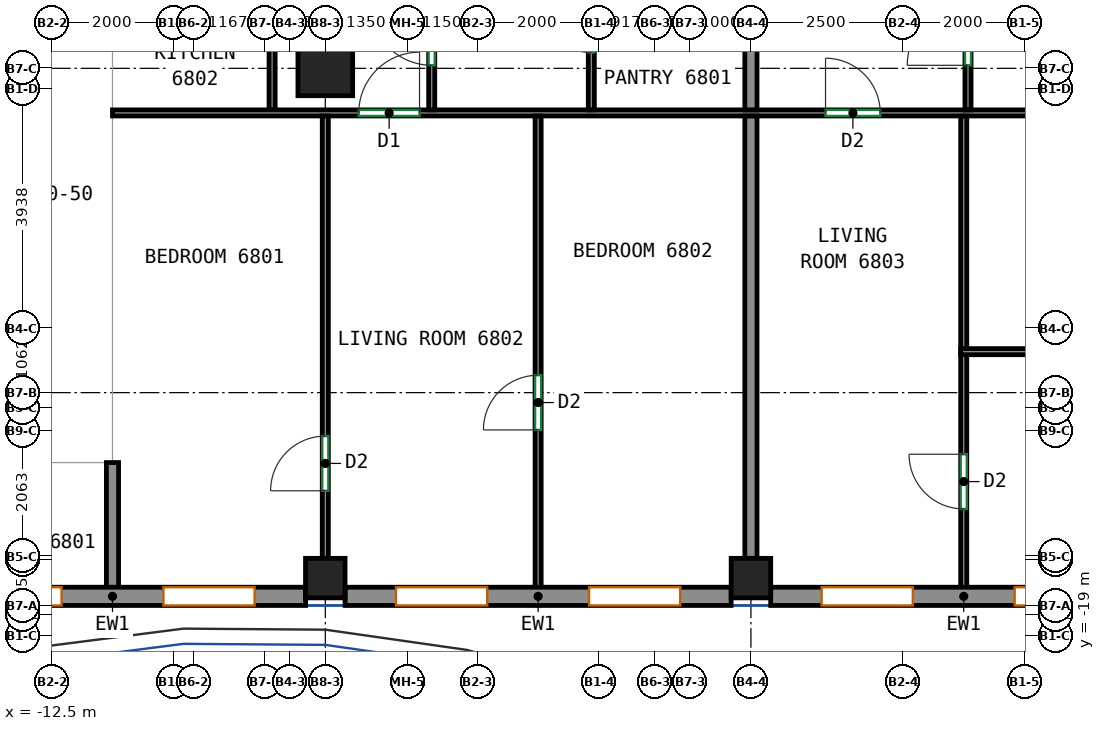
"""IFC4 building model, lengths in metres.
Left out: names, types, materials, properties, quantities, classifications, styles, units other than length and angle.
Written with IfcOpenShell. Run it as: python <this file> out.ifc"""

import sys

from ifc_helpers import new_model, si_unit, direction, frame, frame_2d, origin, origin_2d, place, context, subcontext, project, spatial, rectangle, extrude, source, transform, mapped, element, fill, save


model = new_model("IFC4")
c1 = context("Model", 3, precision=1e-05, world=origin(), true_north=direction((0.0, 1.0)))
c2 = subcontext(c1, "Body", "Model", "MODEL_VIEW")
j1 = project(units=[si_unit("LENGTHUNIT", "METRE"), si_unit("PLANEANGLEUNIT", "RADIAN")], contexts=[c1])
p1 = place(None, origin())
s1 = spatial("IfcSite", under=j1, at=p1, CompositionType="ELEMENT")
p2 = place(p1, origin())
s2 = spatial("IfcBuilding", under=s1, at=p2, CompositionType="ELEMENT")
p3 = place(p2, frame((0.0, 0.0, 277.2)))
s3 = spatial("IfcBuildingStorey", under=s2, at=p3, CompositionType="ELEMENT", Elevation=277.2)
m1 = source(origin(), c2, "Body", "SweptSolid", [
    extrude(rectangle(XDim=0.65, YDim=0.65, at=origin_2d()), origin(), (0.0, 0.0, 1.0), 3.12),
])
p4 = place(p3, frame((-8.0, -18.05, 0.0), z_axis=(0.0, 0.0, 1.0), x_axis=(1.0, 0.0, 0.0)))
e1 = element("IfcColumn", 1, at=p4, inside=s3, PredefinedType="COLUMN", context=c2, shape_type="MappedRepresentation", body=[
    mapped(m1, transform((0.0, 0.0, 0.0))),
])
m2 = source(origin(), c2, "Body", "SweptSolid", [
    extrude(rectangle(XDim=0.9, YDim=0.9, at=origin_2d()), origin(), (0.0, 0.0, 1.0), 3.12),
])
p5 = place(p3, frame((-8.0, -9.667, 0.0), z_axis=(0.0, 0.0, 1.0), x_axis=(1.0, 0.0, 0.0)))
e2 = element("IfcColumn", 2, at=p5, inside=s3, PredefinedType="COLUMN", context=c2, shape_type="MappedRepresentation", body=[
    mapped(m2, transform((0.0, 0.0, 0.0))),
])
p6 = place(p3, frame((-1.0, -18.05, 0.0), z_axis=(0.0, 0.0, 1.0), x_axis=(1.0, 0.0, 0.0)))
e3 = element("IfcColumn", 3, at=p6, inside=s3, PredefinedType="COLUMN", context=c2, shape_type="MappedRepresentation", body=[
    mapped(m1, transform((0.0, 0.0, 0.0))),
])
m3 = source(origin(), c2, "Body", "SweptSolid", [
    extrude(rectangle(XDim=6.35, YDim=0.3, at=frame_2d((3.175, 0.0))), origin(), (0.0, 0.0, 1.0), 3.12),
])
p7 = place(p3, frame((-14.675, -18.35, 0.0), z_axis=(0.0, 0.0, 1.0), x_axis=(1.0, 0.0, 0.0)))
e4 = element("IfcWall", 4, at=p7, inside=s3, PredefinedType="SOLIDWALL", context=c2, shape_type="MappedRepresentation", body=[
    mapped(m3, transform((0.0, 0.0, 0.0))),
])
p8 = place(p7, frame((0.837, 0.0, 0.8)))
e5 = element("IfcOpeningElement", 5, at=p8, cuts=e4, PredefinedType="OPENING", context=c2, shape_type="SweptSolid", body=[
    extrude(rectangle(XDim=1.5, YDim=2.05, at=frame_2d((0.75, 1.025))), frame((0.0, 0.16, 0.0), z_axis=(0.0, -1.0, 0.0), x_axis=(1.0, 0.0, 0.0)), (0.0, 0.0, 1.0), 0.32),
])
p9 = place(p7, frame((4.012, 0.0, 0.8)))
e6 = element("IfcOpeningElement", 6, at=p9, cuts=e4, PredefinedType="OPENING", context=c2, shape_type="SweptSolid", body=[
    extrude(rectangle(XDim=1.5, YDim=2.05, at=frame_2d((0.75, 1.025))), frame((0.0, 0.16, 0.0), z_axis=(0.0, -1.0, 0.0), x_axis=(1.0, 0.0, 0.0)), (0.0, 0.0, 1.0), 0.32),
])
p10 = place(p3, frame((-7.675, -18.35, 0.0), z_axis=(0.0, 0.0, 1.0), x_axis=(1.0, 0.0, 0.0)))
e7 = element("IfcWall", 7, at=p10, inside=s3, PredefinedType="SOLIDWALL", context=c2, shape_type="MappedRepresentation", body=[
    mapped(m3, transform((0.0, 0.0, 0.0))),
])
p11 = place(p10, frame((0.837, 0.0, 0.8)))
e8 = element("IfcOpeningElement", 8, at=p11, cuts=e7, PredefinedType="OPENING", context=c2, shape_type="SweptSolid", body=[
    extrude(rectangle(XDim=1.5, YDim=2.05, at=frame_2d((0.75, 1.025))), frame((0.0, 0.16, 0.0), z_axis=(0.0, -1.0, 0.0), x_axis=(1.0, 0.0, 0.0)), (0.0, 0.0, 1.0), 0.32),
])
p12 = place(p10, frame((4.012, 0.0, 0.8)))
e9 = element("IfcOpeningElement", 9, at=p12, cuts=e7, PredefinedType="OPENING", context=c2, shape_type="SweptSolid", body=[
    extrude(rectangle(XDim=1.5, YDim=2.05, at=frame_2d((0.75, 1.025))), frame((0.0, 0.16, 0.0), z_axis=(0.0, -1.0, 0.0), x_axis=(1.0, 0.0, 0.0)), (0.0, 0.0, 1.0), 0.32),
])
p13 = place(p3, frame((-0.675, -18.35, 0.0), z_axis=(0.0, 0.0, 1.0), x_axis=(1.0, 0.0, 0.0)))
e10 = element("IfcWall", 10, at=p13, inside=s3, PredefinedType="SOLIDWALL", context=c2, shape_type="MappedRepresentation", body=[
    mapped(m3, transform((0.0, 0.0, 0.0))),
])
p14 = place(p13, frame((0.837, 0.0, 0.8)))
e11 = element("IfcOpeningElement", 11, at=p14, cuts=e10, PredefinedType="OPENING", context=c2, shape_type="SweptSolid", body=[
    extrude(rectangle(XDim=1.5, YDim=2.05, at=frame_2d((0.75, 1.025))), frame((0.0, 0.16, 0.0), z_axis=(0.0, -1.0, 0.0), x_axis=(1.0, 0.0, 0.0)), (0.0, 0.0, 1.0), 0.32),
])
p15 = place(p13, frame((4.012, 0.0, 0.8)))
e12 = element("IfcOpeningElement", 12, at=p15, cuts=e10, PredefinedType="OPENING", context=c2, shape_type="SweptSolid", body=[
    extrude(rectangle(XDim=1.5, YDim=2.05, at=frame_2d((0.75, 1.025))), frame((0.0, 0.16, 0.0), z_axis=(0.0, -1.0, 0.0), x_axis=(1.0, 0.0, 0.0)), (0.0, 0.0, 1.0), 0.32),
])
p16 = place(p3, frame((-11.5, -18.25, 0.0), z_axis=(0.0, 0.0, 1.0), x_axis=(0.0, 1.0, 0.0)))
e13 = element("IfcWall", 13, at=p16, inside=s3, PredefinedType="PARTITIONING", context=c2, shape_type="SweptSolid", body=[
    extrude(rectangle(XDim=2.1, YDim=0.2, at=frame_2d((1.05, 0.0))), origin(), (0.0, 0.0, 1.0), 3.12),
])
p17 = place(p3, frame((-8.875, -10.35, 0.0), z_axis=(0.0, 0.0, 1.0), x_axis=(0.0, 1.0, 0.0)))
e14 = element("IfcWall", 14, at=p17, inside=s3, PredefinedType="PARTITIONING", context=c2, shape_type="SweptSolid", body=[
    extrude(rectangle(XDim=2.573, YDim=0.1, at=frame_2d((1.287, 0.0))), origin(), (0.0, 0.0, 1.0), 3.12),
])
p18 = place(p17, frame((1.266, 0.0, 0.0)))
e15 = element("IfcOpeningElement", 15, at=p18, cuts=e14, PredefinedType="OPENING", context=c2, shape_type="SweptSolid", body=[
    extrude(rectangle(XDim=1.0, YDim=2.1, at=frame_2d((0.5, 1.05))), frame((0.0, 0.06, 0.0), z_axis=(0.0, -1.0, 0.0), x_axis=(1.0, 0.0, 0.0)), (0.0, 0.0, 1.0), 0.12),
])
p19 = place(p3, frame((-11.5, -10.4, 0.0), z_axis=(0.0, 0.0, 1.0), x_axis=(1.0, 0.0, 0.0)))
e16 = element("IfcWall", 16, at=p19, inside=s3, PredefinedType="PARTITIONING", context=c2, shape_type="SweptSolid", body=[
    extrude(rectangle(XDim=21.1, YDim=0.1, at=frame_2d((10.55, 0.0))), origin(), (0.0, 0.0, 1.0), 3.12),
])
p20 = place(p19, frame((4.05, 0.0, 0.0)))
e17 = element("IfcOpeningElement", 17, at=p20, cuts=e16, PredefinedType="OPENING", context=c2, shape_type="SweptSolid", body=[
    extrude(rectangle(XDim=1.0, YDim=2.1, at=frame_2d((0.5, 1.05))), frame((0.0, 0.06, 0.0), z_axis=(0.0, -1.0, 0.0), x_axis=(1.0, 0.0, 0.0)), (0.0, 0.0, 1.0), 0.12),
])
p21 = place(p19, frame((11.727, 0.0, 0.0)))
e18 = element("IfcOpeningElement", 18, at=p21, cuts=e16, PredefinedType="OPENING", context=c2, shape_type="SweptSolid", body=[
    extrude(rectangle(XDim=0.9, YDim=2.1, at=frame_2d((0.45, 1.05))), frame((0.0, 0.06, 0.0), z_axis=(0.0, -1.0, 0.0), x_axis=(1.0, 0.0, 0.0)), (0.0, 0.0, 1.0), 0.12),
])
p22 = place(p19, frame((15.225, 0.0, 0.0)))
e19 = element("IfcOpeningElement", 19, at=p22, cuts=e16, PredefinedType="OPENING", context=c2, shape_type="SweptSolid", body=[
    extrude(rectangle(XDim=1.0, YDim=2.1, at=frame_2d((0.5, 1.05))), frame((0.0, 0.06, 0.0), z_axis=(0.0, -1.0, 0.0), x_axis=(1.0, 0.0, 0.0)), (0.0, 0.0, 1.0), 0.12),
])
p23 = place(p3, frame((-6.25, -10.35, 0.0), z_axis=(0.0, 0.0, 1.0), x_axis=(0.0, 1.0, 0.0)))
e20 = element("IfcWall", 20, at=p23, inside=s3, PredefinedType="PARTITIONING", context=c2, shape_type="SweptSolid", body=[
    extrude(rectangle(XDim=2.573, YDim=0.1, at=frame_2d((1.287, 0.0))), origin(), (0.0, 0.0, 1.0), 3.12),
])
p24 = place(p23, frame((0.733, 0.0, 0.0)))
e21 = element("IfcOpeningElement", 21, at=p24, cuts=e20, PredefinedType="OPENING", context=c2, shape_type="SweptSolid", body=[
    extrude(rectangle(XDim=1.0, YDim=2.1, at=frame_2d((0.5, 1.05))), frame((0.0, 0.06, 0.0), z_axis=(0.0, -1.0, 0.0), x_axis=(1.0, 0.0, 0.0)), (0.0, 0.0, 1.0), 0.12),
])
p25 = place(p3, frame((-3.625, -10.35, 0.0), z_axis=(0.0, 0.0, 1.0), x_axis=(0.0, 1.0, 0.0)))
e22 = element("IfcWall", 22, at=p25, inside=s3, PredefinedType="PARTITIONING", context=c2, shape_type="SweptSolid", body=[
    extrude(rectangle(XDim=2.573, YDim=0.1, at=frame_2d((1.287, 0.0))), origin(), (0.0, 0.0, 1.0), 3.12),
])
p26 = place(p25, frame((0.943, 0.0, 0.0)))
e23 = element("IfcOpeningElement", 23, at=p26, cuts=e22, PredefinedType="OPENING", context=c2, shape_type="SweptSolid", body=[
    extrude(rectangle(XDim=0.9, YDim=2.1, at=frame_2d((0.45, 1.05))), frame((0.0, 0.06, 0.0), z_axis=(0.0, -1.0, 0.0), x_axis=(1.0, 0.0, 0.0)), (0.0, 0.0, 1.0), 0.12),
])
p27 = place(p3, frame((-1.0, -10.35, 0.0), z_axis=(0.0, 0.0, 1.0), x_axis=(0.0, 1.0, 0.0)))
e24 = element("IfcWall", 24, at=p27, inside=s3, PredefinedType="PARTITIONING", context=c2, shape_type="SweptSolid", body=[
    extrude(rectangle(XDim=2.573, YDim=0.2, at=frame_2d((1.287, 0.0))), origin(), (0.0, 0.0, 1.0), 3.12),
])
p28 = place(p3, frame((-8.0, -17.725, 0.0), z_axis=(0.0, 0.0, 1.0), x_axis=(0.0, 1.0, 0.0)))
e25 = element("IfcWall", 25, at=p28, inside=s3, PredefinedType="PARTITIONING", context=c2, shape_type="SweptSolid", body=[
    extrude(rectangle(XDim=7.273, YDim=0.1, at=frame_2d((3.637, 0.0))), origin(), (0.0, 0.0, 1.0), 3.12),
])
p29 = place(p28, frame((1.111, 0.0, 0.0)))
e26 = element("IfcOpeningElement", 26, at=p29, cuts=e25, PredefinedType="OPENING", context=c2, shape_type="SweptSolid", body=[
    extrude(rectangle(XDim=0.9, YDim=2.1, at=frame_2d((0.45, 1.05))), frame((0.0, 0.06, 0.0), z_axis=(0.0, -1.0, 0.0), x_axis=(1.0, 0.0, 0.0)), (0.0, 0.0, 1.0), 0.12),
])
p30 = place(p3, frame((-4.5, -18.25, 0.0), z_axis=(0.0, 0.0, 1.0), x_axis=(0.0, 1.0, 0.0)))
e27 = element("IfcWall", 27, at=p30, inside=s3, PredefinedType="PARTITIONING", context=c2, shape_type="SweptSolid", body=[
    extrude(rectangle(XDim=7.798, YDim=0.1, at=frame_2d((3.899, 0.0))), origin(), (0.0, 0.0, 1.0), 3.12),
])
p31 = place(p30, frame((2.637, 0.0, 0.0)))
e28 = element("IfcOpeningElement", 28, at=p31, cuts=e27, PredefinedType="OPENING", context=c2, shape_type="SweptSolid", body=[
    extrude(rectangle(XDim=0.9, YDim=2.1, at=frame_2d((0.45, 1.05))), frame((0.0, 0.06, 0.0), z_axis=(0.0, -1.0, 0.0), x_axis=(1.0, 0.0, 0.0)), (0.0, 0.0, 1.0), 0.12),
])
p32 = place(p3, frame((-1.0, -17.725, 0.0), z_axis=(0.0, 0.0, 1.0), x_axis=(0.0, 1.0, 0.0)))
e29 = element("IfcWall", 29, at=p32, inside=s3, PredefinedType="PARTITIONING", context=c2, shape_type="SweptSolid", body=[
    extrude(rectangle(XDim=7.273, YDim=0.2, at=frame_2d((3.637, 0.0))), origin(), (0.0, 0.0, 1.0), 3.12),
])
p33 = place(p3, frame((2.57, -10.35, 0.0), z_axis=(0.0, 0.0, 1.0), x_axis=(0.0, 1.0, 0.0)))
e30 = element("IfcWall", 30, at=p33, inside=s3, PredefinedType="PARTITIONING", context=c2, shape_type="SweptSolid", body=[
    extrude(rectangle(XDim=2.573, YDim=0.1, at=frame_2d((1.287, 0.0))), origin(), (0.0, 0.0, 1.0), 3.12),
])
p34 = place(p33, frame((0.733, 0.0, 0.0)))
e31 = element("IfcOpeningElement", 31, at=p34, cuts=e30, PredefinedType="OPENING", context=c2, shape_type="SweptSolid", body=[
    extrude(rectangle(XDim=1.0, YDim=2.1, at=frame_2d((0.5, 1.05))), frame((0.0, 0.06, 0.0), z_axis=(0.0, -1.0, 0.0), x_axis=(1.0, 0.0, 0.0)), (0.0, 0.0, 1.0), 0.12),
])
p35 = place(p3, frame((2.5, -18.25, 0.0), z_axis=(0.0, 0.0, 1.0), x_axis=(0.0, 1.0, 0.0)))
e32 = element("IfcWall", 32, at=p35, inside=s3, PredefinedType="PARTITIONING", context=c2, shape_type="SweptSolid", body=[
    extrude(rectangle(XDim=3.884, YDim=0.1, at=frame_2d((1.942, 0.0))), origin(), (0.0, 0.0, 1.0), 3.12),
])
p36 = place(p35, frame((1.337, 0.0, 0.0)))
e33 = element("IfcOpeningElement", 33, at=p36, cuts=e32, PredefinedType="OPENING", context=c2, shape_type="SweptSolid", body=[
    extrude(rectangle(XDim=0.9, YDim=2.1, at=frame_2d((0.45, 1.05))), frame((0.0, 0.06, 0.0), z_axis=(0.0, -1.0, 0.0), x_axis=(1.0, 0.0, 0.0)), (0.0, 0.0, 1.0), 0.12),
])
p37 = place(p3, frame((2.5, -14.286, 0.0), z_axis=(0.0, 0.0, 1.0), x_axis=(0.0, 1.0, 0.0)))
e34 = element("IfcWall", 34, at=p37, inside=s3, PredefinedType="PARTITIONING", context=c2, shape_type="SweptSolid", body=[
    extrude(rectangle(XDim=3.834, YDim=0.1, at=frame_2d((1.917, 0.0))), origin(), (0.0, 0.0, 1.0), 3.12),
])
p38 = place(p3, frame((9.6, -14.326, 0.0), z_axis=(0.0, 0.0, 1.0), x_axis=(-1.0, 0.0, 0.0)))
e35 = element("IfcWall", 35, at=p38, inside=s3, PredefinedType="PARTITIONING", context=c2, shape_type="SweptSolid", body=[
    extrude(rectangle(XDim=7.15, YDim=0.1, at=frame_2d((3.575, 0.0))), origin(), (0.0, 0.0, 1.0), 3.12),
])
p39 = place(p8, origin())
e36 = element("IfcWindow", 36, at=p39, inside=s3, PartitioningType="SINGLE_PANEL", PredefinedType="WINDOW", context=c2, shape_type="SweptSolid", body=[
    extrude(rectangle(XDim=1.5, YDim=2.05, at=frame_2d((0.75, 1.025))), frame((0.0, 0.03, 0.0), z_axis=(0.0, -1.0, 0.0), x_axis=(1.0, 0.0, 0.0)), (0.0, 0.0, 1.0), 0.06),
])
fill(e5, e36)
p40 = place(p9, origin())
e37 = element("IfcWindow", 37, at=p40, inside=s3, PartitioningType="SINGLE_PANEL", PredefinedType="WINDOW", context=c2, shape_type="SweptSolid", body=[
    extrude(rectangle(XDim=1.5, YDim=2.05, at=frame_2d((0.75, 1.025))), frame((0.0, 0.03, 0.0), z_axis=(0.0, -1.0, 0.0), x_axis=(1.0, 0.0, 0.0)), (0.0, 0.0, 1.0), 0.06),
])
fill(e6, e37)
p41 = place(p11, origin())
e38 = element("IfcWindow", 38, at=p41, inside=s3, PartitioningType="SINGLE_PANEL", PredefinedType="WINDOW", context=c2, shape_type="SweptSolid", body=[
    extrude(rectangle(XDim=1.5, YDim=2.05, at=frame_2d((0.75, 1.025))), frame((0.0, 0.03, 0.0), z_axis=(0.0, -1.0, 0.0), x_axis=(1.0, 0.0, 0.0)), (0.0, 0.0, 1.0), 0.06),
])
fill(e8, e38)
p42 = place(p12, origin())
e39 = element("IfcWindow", 39, at=p42, inside=s3, PartitioningType="SINGLE_PANEL", PredefinedType="WINDOW", context=c2, shape_type="SweptSolid", body=[
    extrude(rectangle(XDim=1.5, YDim=2.05, at=frame_2d((0.75, 1.025))), frame((0.0, 0.03, 0.0), z_axis=(0.0, -1.0, 0.0), x_axis=(1.0, 0.0, 0.0)), (0.0, 0.0, 1.0), 0.06),
])
fill(e9, e39)
p43 = place(p14, origin())
e40 = element("IfcWindow", 40, at=p43, inside=s3, PartitioningType="SINGLE_PANEL", PredefinedType="WINDOW", context=c2, shape_type="SweptSolid", body=[
    extrude(rectangle(XDim=1.5, YDim=2.05, at=frame_2d((0.75, 1.025))), frame((0.0, 0.03, 0.0), z_axis=(0.0, -1.0, 0.0), x_axis=(1.0, 0.0, 0.0)), (0.0, 0.0, 1.0), 0.06),
])
fill(e11, e40)
p44 = place(p15, origin())
e41 = element("IfcWindow", 41, at=p44, inside=s3, PartitioningType="SINGLE_PANEL", PredefinedType="WINDOW", context=c2, shape_type="SweptSolid", body=[
    extrude(rectangle(XDim=1.5, YDim=2.05, at=frame_2d((0.75, 1.025))), frame((0.0, 0.03, 0.0), z_axis=(0.0, -1.0, 0.0), x_axis=(1.0, 0.0, 0.0)), (0.0, 0.0, 1.0), 0.06),
])
fill(e12, e41)
p45 = place(p36, origin())
e42 = element("IfcDoor", 42, at=p45, inside=s3, OperationType="SINGLE_SWING_RIGHT", PredefinedType="DOOR", context=c2, shape_type="SweptSolid", body=[
    extrude(rectangle(XDim=0.9, YDim=2.1, at=frame_2d((0.45, 1.05))), frame((0.0, 0.025, 0.0), z_axis=(0.0, -1.0, 0.0), x_axis=(1.0, 0.0, 0.0)), (0.0, 0.0, 1.0), 0.05),
])
fill(e33, e42)
p46 = place(p29, origin())
e43 = element("IfcDoor", 43, at=p46, inside=s3, OperationType="SINGLE_SWING_LEFT", PredefinedType="DOOR", context=c2, shape_type="SweptSolid", body=[
    extrude(rectangle(XDim=0.9, YDim=2.1, at=frame_2d((0.45, 1.05))), frame((0.0, 0.025, 0.0), z_axis=(0.0, -1.0, 0.0), x_axis=(1.0, 0.0, 0.0)), (0.0, 0.0, 1.0), 0.05),
])
fill(e26, e43)
p47 = place(p31, origin())
e44 = element("IfcDoor", 44, at=p47, inside=s3, OperationType="SINGLE_SWING_LEFT", PredefinedType="DOOR", context=c2, shape_type="SweptSolid", body=[
    extrude(rectangle(XDim=0.9, YDim=2.1, at=frame_2d((0.45, 1.05))), frame((0.0, 0.025, 0.0), z_axis=(0.0, -1.0, 0.0), x_axis=(1.0, 0.0, 0.0)), (0.0, 0.0, 1.0), 0.05),
])
fill(e28, e44)
p48 = place(p20, origin())
e45 = element("IfcDoor", 45, at=p48, inside=s3, OperationType="SINGLE_SWING_RIGHT", PredefinedType="DOOR", context=c2, shape_type="SweptSolid", body=[
    extrude(rectangle(XDim=1.0, YDim=2.1, at=frame_2d((0.5, 1.05))), frame((0.0, 0.025, 0.0), z_axis=(0.0, -1.0, 0.0), x_axis=(1.0, 0.0, 0.0)), (0.0, 0.0, 1.0), 0.05),
])
fill(e17, e45)
p49 = place(p21, origin())
e46 = element("IfcDoor", 46, at=p49, inside=s3, OperationType="SINGLE_SWING_LEFT", PredefinedType="DOOR", context=c2, shape_type="SweptSolid", body=[
    extrude(rectangle(XDim=0.9, YDim=2.1, at=frame_2d((0.45, 1.05))), frame((0.0, 0.025, 0.0), z_axis=(0.0, -1.0, 0.0), x_axis=(1.0, 0.0, 0.0)), (0.0, 0.0, 1.0), 0.05),
])
fill(e18, e46)
p50 = place(p24, origin())
e47 = element("IfcDoor", 47, at=p50, inside=s3, OperationType="SINGLE_SWING_RIGHT", PredefinedType="DOOR", context=c2, shape_type="SweptSolid", body=[
    extrude(rectangle(XDim=1.0, YDim=2.1, at=frame_2d((0.5, 1.05))), frame((0.0, 0.025, 0.0), z_axis=(0.0, -1.0, 0.0), x_axis=(1.0, 0.0, 0.0)), (0.0, 0.0, 1.0), 0.05),
])
fill(e21, e47)
p51 = place(p34, origin())
e48 = element("IfcDoor", 48, at=p51, inside=s3, OperationType="SINGLE_SWING_LEFT", PredefinedType="DOOR", context=c2, shape_type="SweptSolid", body=[
    extrude(rectangle(XDim=1.0, YDim=2.1, at=frame_2d((0.5, 1.05))), frame((0.0, 0.025, 0.0), z_axis=(0.0, -1.0, 0.0), x_axis=(1.0, 0.0, 0.0)), (0.0, 0.0, 1.0), 0.05),
])
fill(e31, e48)
p52 = place(p26, origin())
e49 = element("IfcDoor", 49, at=p52, inside=s3, OperationType="SINGLE_SWING_RIGHT", PredefinedType="DOOR", context=c2, shape_type="SweptSolid", body=[
    extrude(rectangle(XDim=0.9, YDim=2.1, at=frame_2d((0.45, 1.05))), frame((0.0, 0.025, 0.0), z_axis=(0.0, -1.0, 0.0), x_axis=(1.0, 0.0, 0.0)), (0.0, 0.0, 1.0), 0.05),
])
fill(e23, e49)
save(model, sys.argv[1])
